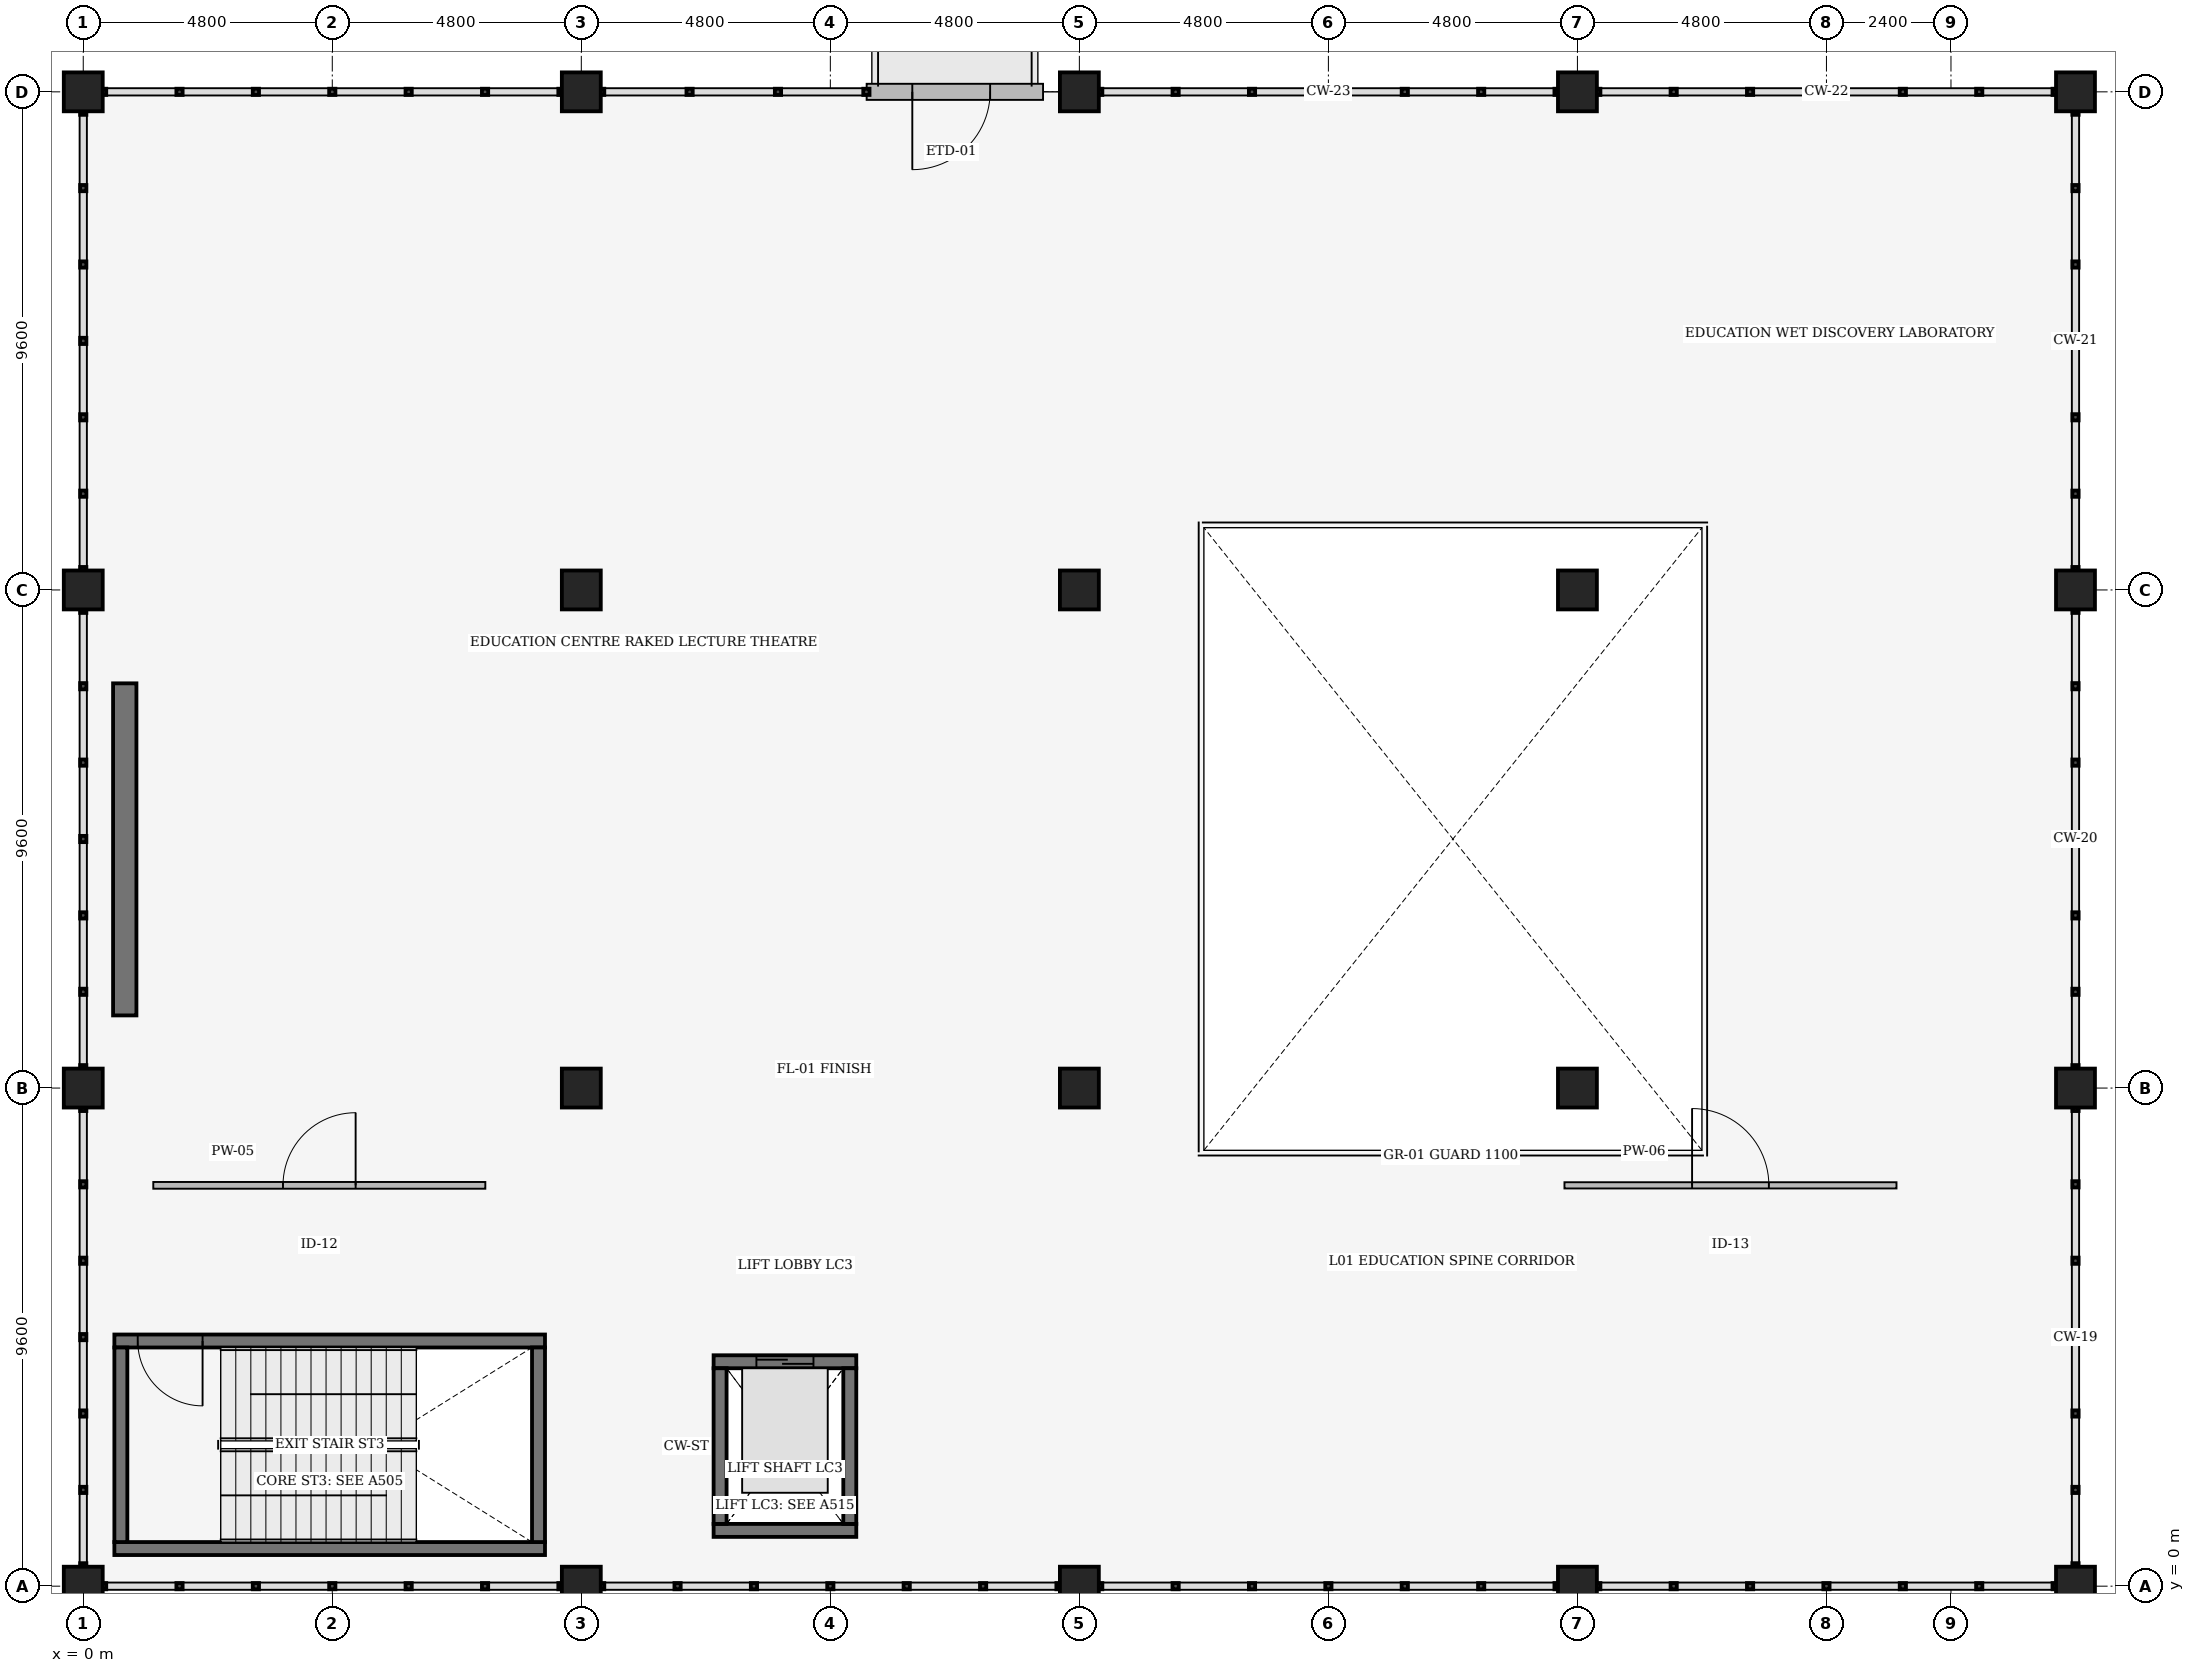
"""IFC4 building model, lengths in metres.
Left out: names, types, materials, properties, quantities, classifications, styles, units other than length and angle.
Written with IfcOpenShell. Run it as: python <this file> out.ifc"""

import sys

from ifc_helpers import new_model, si_unit, direction, frame, frame_2d, origin, origin_2d, place, context, subcontext, project, spatial, rectangle, extrude, element, fill, save


model = new_model("IFC4")
c1 = context("Model", 3, precision=1e-05, world=origin(), true_north=direction((0.0, 1.0)))
c2 = subcontext(c1, "Body", "Model", "MODEL_VIEW")
j1 = project(units=[si_unit("LENGTHUNIT", "METRE"), si_unit("PLANEANGLEUNIT", "RADIAN")], contexts=[c1])
p1 = place(None, origin())
s1 = spatial("IfcSite", under=j1, at=p1, CompositionType="ELEMENT")
p2 = place(p1, origin())
s2 = spatial("IfcBuilding", under=s1, at=p2, CompositionType="ELEMENT")
p3 = place(p2, frame((0.0, 0.0, 5.4)))
s3 = spatial("IfcBuildingStorey", under=s2, at=p3, CompositionType="ELEMENT", Elevation=5.4)
for number, where, z_axis, x_axis in (
    (1, (0.0, 0.0, 0.0), (0.0, 0.0, 1.0), (1.0, 0.0, 0.0)),
    (2, (0.0, 9.6, 0.0), (0.0, 0.0, 1.0), (1.0, 0.0, 0.0)),
    (3, (0.0, 19.2, 0.0), (0.0, 0.0, 1.0), (1.0, 0.0, 0.0)),
    (4, (0.0, 28.8, 0.0), (0.0, 0.0, 1.0), (1.0, 0.0, 0.0)),
    (5, (9.6, 0.0, 0.0), (0.0, 0.0, 1.0), (1.0, 0.0, 0.0)),
    (6, (9.6, 9.6, 0.0), (0.0, 0.0, 1.0), (1.0, 0.0, 0.0)),
    (7, (9.6, 19.2, 0.0), (0.0, 0.0, 1.0), (1.0, 0.0, 0.0)),
    (8, (9.6, 28.8, 0.0), (0.0, 0.0, 1.0), (1.0, 0.0, 0.0)),
    (9, (19.2, 0.0, 0.0), (0.0, 0.0, 1.0), (1.0, 0.0, 0.0)),
    (10, (19.2, 9.6, 0.0), (0.0, 0.0, 1.0), (1.0, 0.0, 0.0)),
    (11, (19.2, 19.2, 0.0), (0.0, 0.0, 1.0), (1.0, 0.0, 0.0)),
    (12, (19.2, 28.8, 0.0), (0.0, 0.0, 1.0), (1.0, 0.0, 0.0)),
    (13, (28.8, 0.0, 0.0), (0.0, 0.0, 1.0), (1.0, 0.0, 0.0)),
    (14, (28.8, 9.6, 0.0), (0.0, 0.0, 1.0), (1.0, 0.0, 0.0)),
    (15, (28.8, 19.2, 0.0), (0.0, 0.0, 1.0), (1.0, 0.0, 0.0)),
    (16, (28.8, 28.8, 0.0), (0.0, 0.0, 1.0), (1.0, 0.0, 0.0)),
    (17, (38.4, 0.0, 0.0), (0.0, 0.0, 1.0), (1.0, 0.0, 0.0)),
    (18, (38.4, 9.6, 0.0), (0.0, 0.0, 1.0), (1.0, 0.0, 0.0)),
    (19, (38.4, 19.2, 0.0), (0.0, 0.0, 1.0), (1.0, 0.0, 0.0)),
    (20, (38.4, 28.8, 0.0), (0.0, 0.0, 1.0), (1.0, 0.0, 0.0)),
):
    element("IfcColumn", number, at=place(p3, frame(where, z_axis=z_axis, x_axis=x_axis)), inside=s3, PredefinedType="COLUMN", context=c2, shape_type="SweptSolid", body=[
        extrude(rectangle(XDim=0.75, YDim=0.75, at=origin_2d()), origin(), (0.0, 0.0, 1.0), 5.1),
    ])
p4 = place(p3, frame((0.8, 11.0, 0.0), z_axis=(0.0, 0.0, 1.0), x_axis=(0.0, 1.0, 0.0)))
e21 = element("IfcWall", 21, at=p4, inside=s3, PredefinedType="SHEAR", context=c2, shape_type="SweptSolid", body=[
    extrude(rectangle(XDim=6.4, YDim=0.45, at=frame_2d((3.2, 0.0))), origin(), (0.0, 0.0, 1.0), 5.1),
])
p5 = place(p3, frame((18.5, 28.8, 0.0), z_axis=(0.0, 0.0, 1.0), x_axis=(-1.0, 0.0, 0.0)))
e22 = element("IfcWall", 22, at=p5, inside=s3, PredefinedType="SOLIDWALL", context=c2, shape_type="SweptSolid", body=[
    extrude(rectangle(XDim=3.4, YDim=0.31, at=frame_2d((1.7, 0.0))), origin(), (0.0, 0.0, 1.0), 4.438),
])
p6 = place(p5, frame((2.52, 0.0, 0.0), z_axis=(0.0, 0.0, 1.0), x_axis=(-1.0, 0.0, 0.0)))
e23 = element("IfcOpeningElement", 23, at=p6, cuts=e22, PredefinedType="OPENING", context=c2, shape_type="SweptSolid", body=[
    extrude(rectangle(XDim=1.5, YDim=2.25, at=frame_2d((0.75, 1.125))), frame((0.0, 0.165, 0.0), z_axis=(0.0, -1.0, 0.0), x_axis=(1.0, 0.0, 0.0)), (0.0, 0.0, 1.0), 0.33),
])
p7 = place(p3, frame((0.6, 0.725, 0.0), z_axis=(0.0, 0.0, 1.0), x_axis=(1.0, 0.0, 0.0)))
e24 = element("IfcWall", 24, at=p7, inside=s3, PredefinedType="SHEAR", context=c2, shape_type="SweptSolid", body=[
    extrude(rectangle(XDim=8.3, YDim=0.25, at=frame_2d((4.15, 0.0))), origin(), (0.0, 0.0, 1.0), 4.8),
])
p8 = place(p3, frame((8.9, 4.725, 0.0), z_axis=(0.0, 0.0, 1.0), x_axis=(-1.0, 0.0, 0.0)))
e25 = element("IfcWall", 25, at=p8, inside=s3, PredefinedType="SHEAR", context=c2, shape_type="SweptSolid", body=[
    extrude(rectangle(XDim=8.3, YDim=0.25, at=frame_2d((4.15, 0.0))), origin(), (0.0, 0.0, 1.0), 4.8),
])
p9 = place(p8, frame((7.85, 0.0, 0.0), z_axis=(0.0, 0.0, 1.0), x_axis=(-1.0, 0.0, 0.0)))
e26 = element("IfcOpeningElement", 26, at=p9, cuts=e25, PredefinedType="OPENING", context=c2, shape_type="SweptSolid", body=[
    extrude(rectangle(XDim=1.25, YDim=2.2, at=frame_2d((0.625, 1.1))), frame((0.0, 0.135, 0.0), z_axis=(0.0, -1.0, 0.0), x_axis=(1.0, 0.0, 0.0)), (0.0, 0.0, 1.0), 0.27),
])
for number, where, z_axis, x_axis in (
    (27, (0.725, 4.6, 0.0), (0.0, 0.0, 1.0), (0.0, -1.0, 0.0)),
    (28, (8.775, 0.85, 0.0), (0.0, 0.0, 1.0), (0.0, 1.0, 0.0)),
):
    element("IfcWall", number, at=place(p3, frame(where, z_axis=z_axis, x_axis=x_axis)), inside=s3, PredefinedType="SHEAR", context=c2, shape_type="SweptSolid", body=[
        extrude(rectangle(XDim=3.75, YDim=0.25, at=frame_2d((1.875, 0.0))), origin(), (0.0, 0.0, 1.0), 4.8),
    ])
p10 = place(p3, frame((12.15, 1.075, 0.0), z_axis=(0.0, 0.0, 1.0), x_axis=(1.0, 0.0, 0.0)))
e29 = element("IfcWall", 29, at=p10, inside=s3, PredefinedType="SHEAR", context=c2, shape_type="SweptSolid", body=[
    extrude(rectangle(XDim=2.75, YDim=0.25, at=frame_2d((1.375, 0.0))), origin(), (0.0, 0.0, 1.0), 4.8),
])
p11 = place(p3, frame((12.15, 4.325, 0.0), z_axis=(0.0, 0.0, 1.0), x_axis=(1.0, 0.0, 0.0)))
e30 = element("IfcWall", 30, at=p11, inside=s3, PredefinedType="SHEAR", context=c2, shape_type="SweptSolid", body=[
    extrude(rectangle(XDim=2.75, YDim=0.25, at=frame_2d((1.375, 0.0))), origin(), (0.0, 0.0, 1.0), 4.8),
])
p12 = place(p11, frame((0.825, 0.0, 0.0)))
e31 = element("IfcOpeningElement", 31, at=p12, cuts=e30, PredefinedType="OPENING", context=c2, shape_type="SweptSolid", body=[
    extrude(rectangle(XDim=1.1, YDim=2.2, at=frame_2d((0.55, 1.1))), frame((0.0, 0.135, 0.0), z_axis=(0.0, -1.0, 0.0), x_axis=(1.0, 0.0, 0.0)), (0.0, 0.0, 1.0), 0.27),
])
for number, where, z_axis, x_axis in (
    (32, (12.275, 1.2, 0.0), (0.0, 0.0, 1.0), (0.0, 1.0, 0.0)),
    (33, (14.775, 1.2, 0.0), (0.0, 0.0, 1.0), (0.0, 1.0, 0.0)),
):
    element("IfcWall", number, at=place(p3, frame(where, z_axis=z_axis, x_axis=x_axis)), inside=s3, PredefinedType="SHEAR", context=c2, shape_type="SweptSolid", body=[
        extrude(rectangle(XDim=3.0, YDim=0.25, at=frame_2d((1.5, 0.0))), origin(), (0.0, 0.0, 1.0), 4.8),
    ])
p13 = place(p3, frame((1.35, 7.725, 0.0), z_axis=(0.0, 0.0, 1.0), x_axis=(1.0, 0.0, 0.0)))
e34 = element("IfcWall", 34, at=p13, inside=s3, PredefinedType="PARTITIONING", context=c2, shape_type="SweptSolid", body=[
    extrude(rectangle(XDim=6.4, YDim=0.13, at=frame_2d((3.2, 0.0))), origin(), (0.0, 0.0, 1.0), 4.74),
])
p14 = place(p13, frame((2.5, 0.0, 0.0)))
e35 = element("IfcOpeningElement", 35, at=p14, cuts=e34, PredefinedType="OPENING", context=c2, shape_type="SweptSolid", body=[
    extrude(rectangle(XDim=1.4, YDim=2.3, at=frame_2d((0.7, 1.15))), frame((0.0, 0.075, 0.0), z_axis=(0.0, -1.0, 0.0), x_axis=(1.0, 0.0, 0.0)), (0.0, 0.0, 1.0), 0.15),
])
p15 = place(p3, frame((28.55, 7.725, 0.0), z_axis=(0.0, 0.0, 1.0), x_axis=(1.0, 0.0, 0.0)))
e36 = element("IfcWall", 36, at=p15, inside=s3, PredefinedType="PARTITIONING", context=c2, shape_type="SweptSolid", body=[
    extrude(rectangle(XDim=6.4, YDim=0.12, at=frame_2d((3.2, 0.0))), origin(), (0.0, 0.0, 1.0), 4.155),
])
p16 = place(p15, frame((2.46, 0.0, 0.0)))
e37 = element("IfcOpeningElement", 37, at=p16, cuts=e36, PredefinedType="OPENING", context=c2, shape_type="SweptSolid", body=[
    extrude(rectangle(XDim=1.48, YDim=2.3, at=frame_2d((0.74, 1.15))), frame((0.0, 0.07, 0.0), z_axis=(0.0, -1.0, 0.0), x_axis=(1.0, 0.0, 0.0)), (0.0, 0.0, 1.0), 0.14),
])
p17 = place(p6, origin())
e38 = element("IfcDoor", 38, at=p17, inside=s3, OperationType="SINGLE_SWING_LEFT", PredefinedType="DOOR", context=c2, shape_type="SweptSolid", body=[
    extrude(rectangle(XDim=1.5, YDim=2.25, at=frame_2d((0.75, 1.125))), frame((0.0, 0.025, 0.0), z_axis=(0.0, -1.0, 0.0), x_axis=(1.0, 0.0, 0.0)), (0.0, 0.0, 1.0), 0.05),
])
fill(e23, e38)
p18 = place(p9, origin())
e39 = element("IfcDoor", 39, at=p18, inside=s3, OperationType="SINGLE_SWING_RIGHT", PredefinedType="DOOR", context=c2, shape_type="SweptSolid", body=[
    extrude(rectangle(XDim=1.25, YDim=2.2, at=frame_2d((0.625, 1.1))), frame((0.0, 0.025, 0.0), z_axis=(0.0, -1.0, 0.0), x_axis=(1.0, 0.0, 0.0)), (0.0, 0.0, 1.0), 0.05),
])
fill(e26, e39)
p19 = place(p12, origin())
e40 = element("IfcDoor", 40, at=p19, inside=s3, OperationType="DOUBLE_DOOR_SLIDING", PredefinedType="DOOR", context=c2, shape_type="SweptSolid", body=[
    extrude(rectangle(XDim=1.1, YDim=2.2, at=frame_2d((0.55, 1.1))), frame((0.0, 0.025, 0.0), z_axis=(0.0, -1.0, 0.0), x_axis=(1.0, 0.0, 0.0)), (0.0, 0.0, 1.0), 0.05),
])
fill(e31, e40)
p20 = place(p14, origin())
e41 = element("IfcDoor", 41, at=p20, inside=s3, OperationType="SINGLE_SWING_RIGHT", PredefinedType="DOOR", context=c2, shape_type="SweptSolid", body=[
    extrude(rectangle(XDim=1.4, YDim=2.3, at=frame_2d((0.7, 1.15))), frame((0.0, 0.025, 0.0), z_axis=(0.0, -1.0, 0.0), x_axis=(1.0, 0.0, 0.0)), (0.0, 0.0, 1.0), 0.05),
])
fill(e35, e41)
p21 = place(p16, origin())
e42 = element("IfcDoor", 42, at=p21, inside=s3, OperationType="SINGLE_SWING_LEFT", PredefinedType="DOOR", context=c2, shape_type="SweptSolid", body=[
    extrude(rectangle(XDim=1.48, YDim=2.3, at=frame_2d((0.74, 1.15))), frame((0.0, 0.025, 0.0), z_axis=(0.0, -1.0, 0.0), x_axis=(1.0, 0.0, 0.0)), (0.0, 0.0, 1.0), 0.05),
])
fill(e37, e42)
save(model, sys.argv[1])
